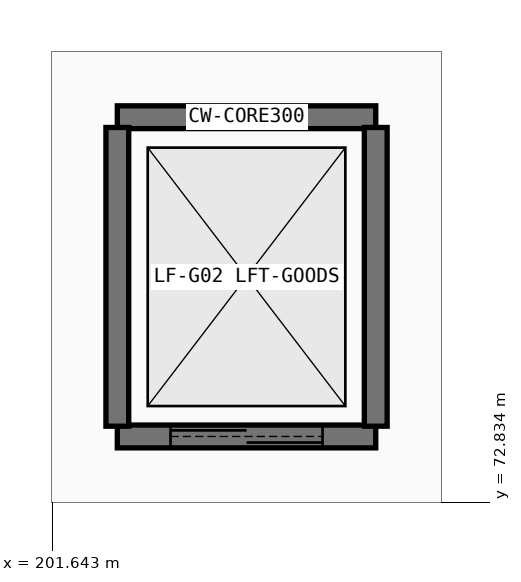
"""IFC4 building model, lengths in metres.
Left out: names, types, materials, properties, quantities, classifications, styles, units other than length and angle.
Written with IfcOpenShell. Run it as: python <this file> out.ifc"""

import sys

from ifc_helpers import new_model, si_unit, direction, frame, frame_2d, origin, place, context, subcontext, project, spatial, rectangle, extrude, element, fill, save


model = new_model("IFC4")
c1 = context("Model", 3, precision=1e-05, world=origin(), true_north=direction((0.0, 1.0)))
c2 = subcontext(c1, "Body", "Model", "MODEL_VIEW")
j1 = project(units=[si_unit("LENGTHUNIT", "METRE"), si_unit("PLANEANGLEUNIT", "RADIAN")], contexts=[c1])
p1 = place(None, origin())
s1 = spatial("IfcSite", under=j1, at=p1, CompositionType="ELEMENT")
p2 = place(p1, origin())
s2 = spatial("IfcBuilding", under=s1, at=p2, CompositionType="ELEMENT")
p3 = place(p2, frame((0.0, 0.0, -5.4)))
s3 = spatial("IfcBuildingStorey", under=s2, at=p3, CompositionType="ELEMENT", Elevation=-5.4)
p4 = place(p3, frame((205.9, 77.9, 0.0), z_axis=(0.0, 0.0, 1.0), x_axis=(-1.0, 0.0, 0.0)))
e1 = element("IfcWall", 1, at=p4, inside=s3, PredefinedType="SHEAR", context=c2, shape_type="SweptSolid", body=[
    extrude(rectangle(XDim=3.4, YDim=0.3, at=frame_2d((1.7, 0.0))), origin(), (0.0, 0.0, 1.0), 5.04),
])
p5 = place(p3, frame((202.5, 73.7, 0.0), z_axis=(0.0, 0.0, 1.0), x_axis=(1.0, 0.0, 0.0)))
e2 = element("IfcWall", 2, at=p5, inside=s3, PredefinedType="SHEAR", context=c2, shape_type="SweptSolid", body=[
    extrude(rectangle(XDim=3.4, YDim=0.3, at=frame_2d((1.7, 0.0))), origin(), (0.0, 0.0, 1.0), 5.04),
])
p6 = place(p5, frame((0.7, 0.0, 0.0)))
e3 = element("IfcOpeningElement", 3, at=p6, cuts=e2, PredefinedType="OPENING", context=c2, shape_type="SweptSolid", body=[
    extrude(rectangle(XDim=2.0, YDim=2.5, at=frame_2d((1.0, 1.25))), frame((0.0, 0.16, 0.0), z_axis=(0.0, -1.0, 0.0), x_axis=(1.0, 0.0, 0.0)), (0.0, 0.0, 1.0), 0.32),
])
for number, where, z_axis, x_axis in (
    (4, (205.9, 73.835, 0.0), (0.0, 0.0, 1.0), (0.0, 1.0, 0.0)),
    (5, (202.5, 77.765, 0.0), (0.0, 0.0, 1.0), (0.0, -1.0, 0.0)),
):
    element("IfcWall", number, at=place(p3, frame(where, z_axis=z_axis, x_axis=x_axis)), inside=s3, PredefinedType="SHEAR", context=c2, shape_type="SweptSolid", body=[
        extrude(rectangle(XDim=3.93, YDim=0.3, at=frame_2d((1.965, 0.0))), origin(), (0.0, 0.0, 1.0), 5.04),
    ])
p7 = place(p6, origin())
e6 = element("IfcDoor", 6, at=p7, inside=s3, OperationType="DOUBLE_DOOR_SLIDING", PredefinedType="DOOR", context=c2, shape_type="SweptSolid", body=[
    extrude(rectangle(XDim=2.0, YDim=2.5, at=frame_2d((1.0, 1.25))), frame((0.0, 0.025, 0.0), z_axis=(0.0, -1.0, 0.0), x_axis=(1.0, 0.0, 0.0)), (0.0, 0.0, 1.0), 0.05),
])
fill(e3, e6)
save(model, sys.argv[1])
